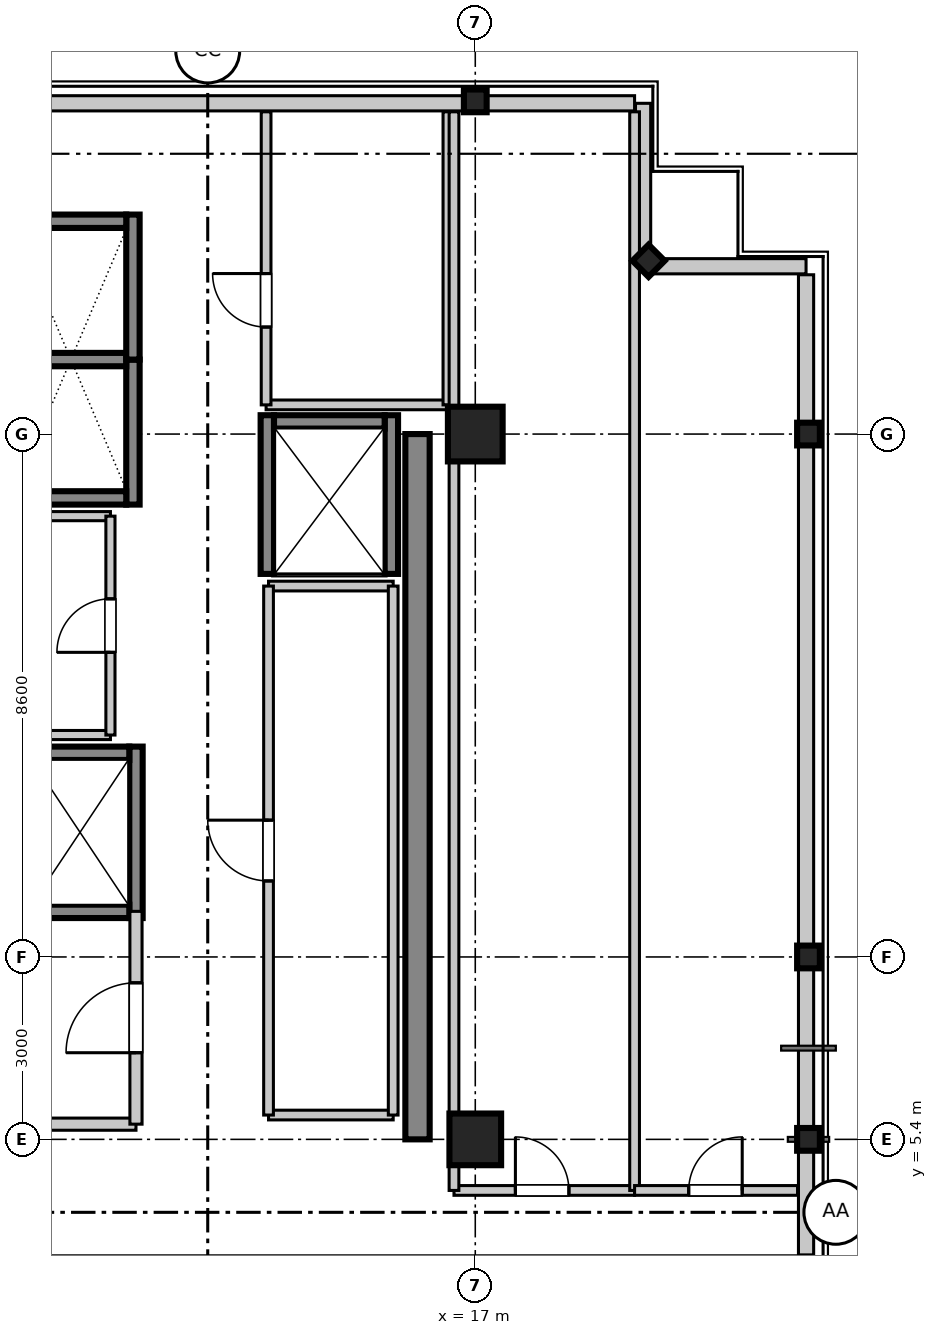
"""IFC4 building model, lengths in metres.
Left out: names, types, materials, properties, quantities, classifications, styles, units other than length and angle.
Written with IfcOpenShell. Run it as: python <this file> out.ifc"""

import sys

from ifc_helpers import new_model, si_unit, direction, frame, frame_2d, origin, origin_2d, place, context, subcontext, project, spatial, rectangle, i_section, extrude, source, transform, mapped, element, fill, save


model = new_model("IFC4")
c1 = context("Model", 3, precision=1e-05, world=origin(), true_north=direction((0.0, 1.0)))
c2 = subcontext(c1, "Body", "Model", "MODEL_VIEW")
j1 = project(units=[si_unit("LENGTHUNIT", "METRE"), si_unit("PLANEANGLEUNIT", "RADIAN")], contexts=[c1])
p1 = place(None, origin())
s1 = spatial("IfcSite", under=j1, at=p1, CompositionType="ELEMENT")
p2 = place(p1, origin())
s2 = spatial("IfcBuilding", under=s1, at=p2, CompositionType="ELEMENT")
p3 = place(p2, frame((0.0, 0.0, 296.5)))
s3 = spatial("IfcBuildingStorey", under=s2, at=p3, CompositionType="ELEMENT", Elevation=296.5)
m1 = source(origin(), c2, "Body", "SweptSolid", [
    extrude(rectangle(XDim=0.85, YDim=0.85, at=origin_2d()), origin(), (0.0, 0.0, 1.0), 3.805),
])
p4 = place(p3, frame((17.0, 5.4, 0.0), z_axis=(0.0, 0.0, 1.0), x_axis=(1.0, 0.0, 0.0)))
e1 = element("IfcColumn", 1, at=p4, inside=s3, PredefinedType="PILASTER", context=c2, shape_type="MappedRepresentation", body=[
    mapped(m1, transform((0.0, 0.0, 0.0), scale=1.0)),
])
m2 = source(origin(), c2, "Body", "SweptSolid", [
    extrude(rectangle(XDim=0.9, YDim=0.9, at=origin_2d()), origin(), (0.0, 0.0, 1.0), 3.805),
])
p5 = place(p3, frame((17.0, 17.0, 0.0), z_axis=(0.0, 0.0, 1.0), x_axis=(1.0, 0.0, 0.0)))
e2 = element("IfcColumn", 2, at=p5, inside=s3, PredefinedType="COLUMN", context=c2, shape_type="MappedRepresentation", body=[
    mapped(m2, transform((0.0, 0.0, 0.0), scale=1.0)),
])
m3 = source(origin(), c2, "Body", "SweptSolid", [
    extrude(i_section(OverallWidth=0.374, OverallDepth=0.374, WebThickness=0.014, FlangeThickness=0.023, at=origin_2d()), origin(), (0.0, 0.0, 1.0), 3.805),
])
for number, where, z_axis, x_axis in (
    (3, (22.48, 5.4, 0.0), (0.0, 0.0, 1.0), (1.0, 0.0, 0.0)),
    (4, (22.48, 8.4, 0.0), (0.0, 0.0, 1.0), (1.0, 0.0, 0.0)),
    (5, (22.48, 17.0, 0.0), (0.0, 0.0, 1.0), (1.0, 0.0, 0.0)),
    (6, (17.0, 22.48, 0.0), (0.0, 0.0, 1.0), (0.0, 1.0, 0.0)),
    (7, (19.85, 19.85, 0.0), (0.0, 0.0, 1.0), (0.707, 0.707, 0.0)),
):
    element("IfcColumn", number, at=place(p3, frame(where, z_axis=z_axis, x_axis=x_axis)), inside=s3, PredefinedType="COLUMN", context=c2, shape_type="MappedRepresentation", body=[
        mapped(m3, transform((0.0, 0.0, 0.0), scale=1.0)),
    ])
m4 = source(origin(), c2, "Body", "SweptSolid", [
    extrude(rectangle(XDim=11.6, YDim=0.4, at=frame_2d((5.8, 0.0))), origin(), (0.0, 0.0, 1.0), 3.55),
])
p6 = place(p3, frame((16.05, 5.4, 0.0), z_axis=(0.0, 0.0, 1.0), x_axis=(0.0, 1.0, 0.0)))
e8 = element("IfcWall", 8, at=p6, inside=s3, PredefinedType="SHEAR", context=c2, shape_type="MappedRepresentation", body=[
    mapped(m4, transform((0.0, 0.0, 0.0), scale=1.0)),
])
m5 = source(origin(), c2, "Body", "SweptSolid", [
    extrude(rectangle(XDim=2.385, YDim=0.22, at=frame_2d((1.192, 0.0))), origin(), (0.0, 0.0, 1.0), 3.55),
])
p7 = place(p3, frame((11.37, 15.84, 0.0), z_axis=(0.0, 0.0, 1.0), x_axis=(0.0, 1.0, 0.0)))
e9 = element("IfcWall", 9, at=p7, inside=s3, PredefinedType="SHEAR", context=c2, shape_type="MappedRepresentation", body=[
    mapped(m5, transform((0.0, 0.0, 0.0), scale=1.0)),
])
m6 = source(origin(), c2, "Body", "SweptSolid", [
    extrude(rectangle(XDim=1.82, YDim=0.22, at=frame_2d((0.91, 0.0))), origin(), (0.0, 0.0, 1.0), 3.55),
])
p8 = place(p3, frame((9.44, 15.95, 0.0), z_axis=(0.0, 0.0, 1.0), x_axis=(1.0, 0.0, 0.0)))
e10 = element("IfcWall", 10, at=p8, inside=s3, PredefinedType="SHEAR", context=c2, shape_type="MappedRepresentation", body=[
    mapped(m6, transform((0.0, 0.0, 0.0), scale=1.0)),
])
m7 = source(origin(), c2, "Body", "SweptSolid", [
    extrude(rectangle(XDim=1.82, YDim=0.22, at=frame_2d((0.91, 0.0))), origin(), (0.0, 0.0, 1.0), 3.85),
])
p9 = place(p3, frame((9.44, 18.225, 0.0), z_axis=(0.0, 0.0, 1.0), x_axis=(1.0, 0.0, 0.0)))
e11 = element("IfcWall", 11, at=p9, inside=s3, PredefinedType="SHEAR", context=c2, shape_type="MappedRepresentation", body=[
    mapped(m7, transform((0.0, 0.0, 0.0), scale=1.0)),
])
p10 = place(p3, frame((11.37, 18.225, 0.0), z_axis=(0.0, 0.0, 1.0), x_axis=(0.0, 1.0, 0.0)))
e12 = element("IfcWall", 12, at=p10, inside=s3, PredefinedType="SHEAR", context=c2, shape_type="MappedRepresentation", body=[
    mapped(m5, transform((0.0, 0.0, 0.0), scale=1.0)),
])
p11 = place(p3, frame((9.44, 20.5, 0.0), z_axis=(0.0, 0.0, 1.0), x_axis=(1.0, 0.0, 0.0)))
e13 = element("IfcWall", 13, at=p11, inside=s3, PredefinedType="SHEAR", context=c2, shape_type="MappedRepresentation", body=[
    mapped(m6, transform((0.0, 0.0, 0.0), scale=1.0)),
])
m8 = source(origin(), c2, "Body", "SweptSolid", [
    extrude(rectangle(XDim=2.82, YDim=0.22, at=frame_2d((1.41, 0.0))), origin(), (0.0, 0.0, 1.0), 3.55),
])
p12 = place(p3, frame((11.42, 9.04, 0.0), z_axis=(0.0, 0.0, 1.0), x_axis=(0.0, 1.0, 0.0)))
e14 = element("IfcWall", 14, at=p12, inside=s3, PredefinedType="SHEAR", context=c2, shape_type="MappedRepresentation", body=[
    mapped(m8, transform((0.0, 0.0, 0.0), scale=1.0)),
])
m9 = source(origin(), c2, "Body", "SweptSolid", [
    extrude(rectangle(XDim=1.62, YDim=0.22, at=frame_2d((0.81, 0.0))), origin(), (0.0, 0.0, 1.0), 3.55),
])
for number, where, z_axis, x_axis in (
    (15, (9.69, 9.15, 0.0), (0.0, 0.0, 1.0), (1.0, 0.0, 0.0)),
    (16, (9.69, 11.75, 0.0), (0.0, 0.0, 1.0), (1.0, 0.0, 0.0)),
):
    element("IfcWall", number, at=place(p3, frame(where, z_axis=z_axis, x_axis=x_axis)), inside=s3, PredefinedType="SHEAR", context=c2, shape_type="MappedRepresentation", body=[
        mapped(m9, transform((0.0, 0.0, 0.0), scale=1.0)),
    ])
m10 = source(origin(), c2, "Body", "SweptSolid", [
    extrude(rectangle(XDim=2.61, YDim=0.22, at=frame_2d((1.305, 0.0))), origin(), (0.0, 0.0, 1.0), 3.55),
])
for number, where, z_axis, x_axis in (
    (17, (13.58, 14.7, 0.0), (0.0, 0.0, 1.0), (0.0, 1.0, 0.0)),
    (18, (15.62, 14.7, 0.0), (0.0, 0.0, 1.0), (0.0, 1.0, 0.0)),
):
    element("IfcWall", number, at=place(p3, frame(where, z_axis=z_axis, x_axis=x_axis)), inside=s3, PredefinedType="SHEAR", context=c2, shape_type="MappedRepresentation", body=[
        mapped(m10, transform((0.0, 0.0, 0.0), scale=1.0)),
    ])
p13 = place(p3, frame((13.69, 17.2, 0.0), z_axis=(0.0, 0.0, 1.0), x_axis=(1.0, 0.0, 0.0)))
e19 = element("IfcWall", 19, at=p13, inside=s3, PredefinedType="SHEAR", context=c2, shape_type="MappedRepresentation", body=[
    mapped(m6, transform((0.0, 0.0, 0.0), scale=1.0)),
])
m11 = source(origin(), c2, "Body", "SweptSolid", [
    extrude(rectangle(XDim=3.82, YDim=0.2, at=frame_2d((1.91, 0.0))), origin(), (0.0, 0.0, 1.0), 2.89),
])
p14 = place(p3, frame((7.6, 5.65, 0.0), z_axis=(0.0, 0.0, 1.0), x_axis=(1.0, 0.0, 0.0)))
e20 = element("IfcWall", 20, at=p14, inside=s3, PredefinedType="PARTITIONING", context=c2, shape_type="MappedRepresentation", body=[
    mapped(m11, transform((0.0, 0.0, 0.0), scale=1.0)),
])
m12 = source(origin(), c2, "Body", "SweptSolid", [
    extrude(rectangle(XDim=3.5, YDim=0.2, at=frame_2d((1.75, 0.0))), origin(), (0.0, 0.0, 1.0), 2.89),
])
p15 = place(p3, frame((11.42, 5.65, 0.0), z_axis=(0.0, 0.0, 1.0), x_axis=(0.0, 1.0, 0.0)))
e21 = element("IfcWall", 21, at=p15, inside=s3, PredefinedType="PARTITIONING", context=c2, shape_type="MappedRepresentation", body=[
    mapped(m12, transform((0.0, 0.0, 0.0), scale=1.0)),
])
p16 = place(p15, frame((1.175, 0.0, 0.0)))
e22 = element("IfcOpeningElement", 22, at=p16, cuts=e21, PredefinedType="OPENING", context=c2, shape_type="SweptSolid", body=[
    extrude(rectangle(XDim=1.15, YDim=2.15, at=frame_2d((0.575, 1.075))), frame((0.0, 0.11, 0.0), z_axis=(0.0, -1.0, 0.0), x_axis=(1.0, 0.0, 0.0)), (0.0, 0.0, 1.0), 0.22),
])
m13 = source(origin(), c2, "Body", "SweptSolid", [
    extrude(rectangle(XDim=1.75, YDim=0.15, at=frame_2d((0.875, 0.0))), origin(), (0.0, 0.0, 1.0), 2.89),
])
for number, where, z_axis, x_axis in (
    (23, (9.25, 12.05, 0.0), (0.0, 0.0, 1.0), (1.0, 0.0, 0.0)),
    (24, (9.25, 15.65, 0.0), (0.0, 0.0, 1.0), (1.0, 0.0, 0.0)),
):
    element("IfcWall", number, at=place(p3, frame(where, z_axis=z_axis, x_axis=x_axis)), inside=s3, PredefinedType="PARTITIONING", context=c2, shape_type="MappedRepresentation", body=[
        mapped(m13, transform((0.0, 0.0, 0.0), scale=1.0)),
    ])
m14 = source(origin(), c2, "Body", "SweptSolid", [
    extrude(rectangle(XDim=3.6, YDim=0.15, at=frame_2d((1.8, 0.0))), origin(), (0.0, 0.0, 1.0), 2.89),
])
p17 = place(p3, frame((11.0, 12.05, 0.0), z_axis=(0.0, 0.0, 1.0), x_axis=(0.0, 1.0, 0.0)))
e25 = element("IfcWall", 25, at=p17, inside=s3, PredefinedType="PARTITIONING", context=c2, shape_type="MappedRepresentation", body=[
    mapped(m14, transform((0.0, 0.0, 0.0), scale=1.0)),
])
p18 = place(p17, frame((1.36, 0.0, 0.0)))
e26 = element("IfcOpeningElement", 26, at=p18, cuts=e25, PredefinedType="OPENING", context=c2, shape_type="SweptSolid", body=[
    extrude(rectangle(XDim=0.88, YDim=2.1, at=frame_2d((0.44, 1.05))), frame((0.0, 0.085, 0.0), z_axis=(0.0, -1.0, 0.0), x_axis=(1.0, 0.0, 0.0)), (0.0, 0.0, 1.0), 0.17),
])
m15 = source(origin(), c2, "Body", "SweptSolid", [
    extrude(rectangle(XDim=16.0, YDim=0.25, at=frame_2d((8.0, 0.0))), origin(), (0.0, 0.0, 1.0), 2.89),
])
p19 = place(p3, frame((3.62, 22.44, 0.0), z_axis=(0.0, 0.0, 1.0), x_axis=(1.0, 0.0, 0.0)))
e27 = element("IfcWall", 27, at=p19, inside=s3, PredefinedType="STANDARD", context=c2, shape_type="MappedRepresentation", body=[
    mapped(m15, transform((0.0, 0.0, 0.0), scale=1.0)),
])
m16 = source(origin(), c2, "Body", "SweptSolid", [
    extrude(rectangle(XDim=2.54, YDim=0.25, at=frame_2d((1.27, 0.0))), origin(), (0.0, 0.0, 1.0), 2.89),
])
for number, where, z_axis, x_axis in (
    (28, (19.76, 19.9, 0.0), (0.0, 0.0, 1.0), (0.0, 1.0, 0.0)),
    (29, (19.9, 19.76, 0.0), (0.0, 0.0, 1.0), (1.0, 0.0, 0.0)),
):
    element("IfcWall", number, at=place(p3, frame(where, z_axis=z_axis, x_axis=x_axis)), inside=s3, PredefinedType="STANDARD", context=c2, shape_type="MappedRepresentation", body=[
        mapped(m16, transform((0.0, 0.0, 0.0), scale=1.0)),
    ])
m17 = source(origin(), c2, "Body", "SweptSolid", [
    extrude(rectangle(XDim=16.12, YDim=0.25, at=frame_2d((8.06, 0.0))), origin(), (0.0, 0.0, 1.0), 2.89),
])
p20 = place(p3, frame((22.44, 3.5, 0.0), z_axis=(0.0, 0.0, 1.0), x_axis=(0.0, 1.0, 0.0)))
e30 = element("IfcWall", 30, at=p20, inside=s3, PredefinedType="STANDARD", context=c2, shape_type="MappedRepresentation", body=[
    mapped(m17, transform((0.0, 0.0, 0.0), scale=1.0)),
])
m18 = source(origin(), c2, "Body", "SweptSolid", [
    extrude(rectangle(XDim=2.05, YDim=0.16, at=frame_2d((1.025, 0.0))), origin(), (0.0, 0.0, 1.0), 2.89),
])
for number, where, z_axis, x_axis in (
    (31, (13.6, 5.8, 0.0), (0.0, 0.0, 1.0), (1.0, 0.0, 0.0)),
    (32, (13.6, 14.5, 0.0), (0.0, 0.0, 1.0), (1.0, 0.0, 0.0)),
):
    element("IfcWall", number, at=place(p3, frame(where, z_axis=z_axis, x_axis=x_axis)), inside=s3, PredefinedType="PARTITIONING", context=c2, shape_type="MappedRepresentation", body=[
        mapped(m18, transform((0.0, 0.0, 0.0), scale=1.0)),
    ])
m19 = source(origin(), c2, "Body", "SweptSolid", [
    extrude(rectangle(XDim=8.7, YDim=0.16, at=frame_2d((4.35, 0.0))), origin(), (0.0, 0.0, 1.0), 2.89),
])
p21 = place(p3, frame((13.6, 5.8, 0.0), z_axis=(0.0, 0.0, 1.0), x_axis=(0.0, 1.0, 0.0)))
e33 = element("IfcWall", 33, at=p21, inside=s3, PredefinedType="PARTITIONING", context=c2, shape_type="MappedRepresentation", body=[
    mapped(m19, transform((0.0, 0.0, 0.0), scale=1.0)),
])
p22 = place(p21, frame((3.85, 0.0, 0.0)))
e34 = element("IfcOpeningElement", 34, at=p22, cuts=e33, PredefinedType="OPENING", context=c2, shape_type="SweptSolid", body=[
    extrude(rectangle(XDim=1.0, YDim=2.1, at=frame_2d((0.5, 1.05))), frame((0.0, 0.09, 0.0), z_axis=(0.0, -1.0, 0.0), x_axis=(1.0, 0.0, 0.0)), (0.0, 0.0, 1.0), 0.18),
])
p23 = place(p3, frame((15.65, 5.8, 0.0), z_axis=(0.0, 0.0, 1.0), x_axis=(0.0, 1.0, 0.0)))
e35 = element("IfcWall", 35, at=p23, inside=s3, PredefinedType="PARTITIONING", context=c2, shape_type="MappedRepresentation", body=[
    mapped(m19, transform((0.0, 0.0, 0.0), scale=1.0)),
])
m20 = source(origin(), c2, "Body", "SweptSolid", [
    extrude(rectangle(XDim=2.99, YDim=0.16, at=frame_2d((1.495, 0.0))), origin(), (0.0, 0.0, 1.0), 2.89),
])
p24 = place(p3, frame((13.56, 17.48, 0.0), z_axis=(0.0, 0.0, 1.0), x_axis=(1.0, 0.0, 0.0)))
e36 = element("IfcWall", 36, at=p24, inside=s3, PredefinedType="PARTITIONING", context=c2, shape_type="MappedRepresentation", body=[
    mapped(m20, transform((0.0, 0.0, 0.0), scale=1.0)),
])
m21 = source(origin(), c2, "Body", "SweptSolid", [
    extrude(rectangle(XDim=4.82, YDim=0.16, at=frame_2d((2.41, 0.0))), origin(), (0.0, 0.0, 1.0), 2.89),
])
p25 = place(p3, frame((13.56, 17.48, 0.0), z_axis=(0.0, 0.0, 1.0), x_axis=(0.0, 1.0, 0.0)))
e37 = element("IfcWall", 37, at=p25, inside=s3, PredefinedType="PARTITIONING", context=c2, shape_type="MappedRepresentation", body=[
    mapped(m21, transform((0.0, 0.0, 0.0), scale=1.0)),
])
p26 = place(p25, frame((1.28, 0.0, 0.0)))
e38 = element("IfcOpeningElement", 38, at=p26, cuts=e37, PredefinedType="OPENING", context=c2, shape_type="SweptSolid", body=[
    extrude(rectangle(XDim=0.88, YDim=2.1, at=frame_2d((0.44, 1.05))), frame((0.0, 0.09, 0.0), z_axis=(0.0, -1.0, 0.0), x_axis=(1.0, 0.0, 0.0)), (0.0, 0.0, 1.0), 0.18),
])
p27 = place(p3, frame((16.55, 17.48, 0.0), z_axis=(0.0, 0.0, 1.0), x_axis=(0.0, 1.0, 0.0)))
e39 = element("IfcWall", 39, at=p27, inside=s3, PredefinedType="PARTITIONING", context=c2, shape_type="MappedRepresentation", body=[
    mapped(m21, transform((0.0, 0.0, 0.0), scale=1.0)),
])
m22 = source(origin(), c2, "Body", "SweptSolid", [
    extrude(rectangle(XDim=2.97, YDim=0.16, at=frame_2d((1.485, 0.0))), origin(), (0.0, 0.0, 1.0), 2.89),
])
p28 = place(p3, frame((16.65, 4.56, 0.0), z_axis=(0.0, 0.0, 1.0), x_axis=(1.0, 0.0, 0.0)))
e40 = element("IfcWall", 40, at=p28, inside=s3, PredefinedType="PARTITIONING", context=c2, shape_type="MappedRepresentation", body=[
    mapped(m22, transform((0.0, 0.0, 0.0), scale=1.0)),
])
p29 = place(p28, frame((1.01, 0.0, 0.0)))
e41 = element("IfcOpeningElement", 41, at=p29, cuts=e40, PredefinedType="OPENING", context=c2, shape_type="SweptSolid", body=[
    extrude(rectangle(XDim=0.88, YDim=2.1, at=frame_2d((0.44, 1.05))), frame((0.0, 0.09, 0.0), z_axis=(0.0, -1.0, 0.0), x_axis=(1.0, 0.0, 0.0)), (0.0, 0.0, 1.0), 0.18),
])
m23 = source(origin(), c2, "Body", "SweptSolid", [
    extrude(rectangle(XDim=17.74, YDim=0.16, at=frame_2d((8.87, 0.0))), origin(), (0.0, 0.0, 1.0), 2.89),
])
for number, where, z_axis, x_axis in (
    (42, (16.65, 4.56, 0.0), (0.0, 0.0, 1.0), (0.0, 1.0, 0.0)),
    (43, (19.62, 4.56, 0.0), (0.0, 0.0, 1.0), (0.0, 1.0, 0.0)),
):
    element("IfcWall", number, at=place(p3, frame(where, z_axis=z_axis, x_axis=x_axis)), inside=s3, PredefinedType="PARTITIONING", context=c2, shape_type="MappedRepresentation", body=[
        mapped(m23, transform((0.0, 0.0, 0.0), scale=1.0)),
    ])
m24 = source(origin(), c2, "Body", "SweptSolid", [
    extrude(rectangle(XDim=2.68, YDim=0.16, at=frame_2d((1.34, 0.0))), origin(), (0.0, 0.0, 1.0), 2.89),
])
p30 = place(p3, frame((19.62, 4.56, 0.0), z_axis=(0.0, 0.0, 1.0), x_axis=(1.0, 0.0, 0.0)))
e44 = element("IfcWall", 44, at=p30, inside=s3, PredefinedType="PARTITIONING", context=c2, shape_type="MappedRepresentation", body=[
    mapped(m24, transform((0.0, 0.0, 0.0), scale=1.0)),
])
p31 = place(p30, frame((0.89, 0.0, 0.0)))
e45 = element("IfcOpeningElement", 45, at=p31, cuts=e44, PredefinedType="OPENING", context=c2, shape_type="SweptSolid", body=[
    extrude(rectangle(XDim=0.88, YDim=2.1, at=frame_2d((0.44, 1.05))), frame((0.0, 0.09, 0.0), z_axis=(0.0, -1.0, 0.0), x_axis=(1.0, 0.0, 0.0)), (0.0, 0.0, 1.0), 0.18),
])
m25 = source(origin(), c2, "Body", "SweptSolid", [
    extrude(rectangle(XDim=1.15, YDim=2.15, at=frame_2d((0.575, 1.075))), frame((0.0, 0.025, 0.0), z_axis=(0.0, -1.0, 0.0), x_axis=(1.0, 0.0, 0.0)), (0.0, 0.0, 1.0), 0.05),
])
p32 = place(p16, frame((1.15, 0.0, 0.0), z_axis=(0.0, 0.0, 1.0), x_axis=(-1.0, 0.0, 0.0)))
e46 = element("IfcDoor", 46, at=p32, inside=s3, OperationType="SINGLE_SWING_LEFT", PredefinedType="DOOR", context=c2, shape_type="MappedRepresentation", body=[
    mapped(m25, transform((0.0, 0.0, 0.0), scale=1.0)),
])
fill(e22, e46)
m26 = source(origin(), c2, "Body", "SweptSolid", [
    extrude(rectangle(XDim=0.88, YDim=2.1, at=frame_2d((0.44, 1.05))), frame((0.0, 0.025, 0.0), z_axis=(0.0, -1.0, 0.0), x_axis=(1.0, 0.0, 0.0)), (0.0, 0.0, 1.0), 0.05),
])
p33 = place(p18, origin())
e47 = element("IfcDoor", 47, at=p33, inside=s3, OperationType="SINGLE_SWING_LEFT", PredefinedType="DOOR", context=c2, shape_type="MappedRepresentation", body=[
    mapped(m26, transform((0.0, 0.0, 0.0), scale=1.0)),
])
fill(e26, e47)
m27 = source(origin(), c2, "Body", "SweptSolid", [
    extrude(rectangle(XDim=1.0, YDim=2.1, at=frame_2d((0.5, 1.05))), frame((0.0, 0.025, 0.0), z_axis=(0.0, -1.0, 0.0), x_axis=(1.0, 0.0, 0.0)), (0.0, 0.0, 1.0), 0.05),
])
p34 = place(p22, frame((1.0, 0.0, 0.0), z_axis=(0.0, 0.0, 1.0), x_axis=(-1.0, 0.0, 0.0)))
e48 = element("IfcDoor", 48, at=p34, inside=s3, OperationType="SINGLE_SWING_RIGHT", PredefinedType="DOOR", context=c2, shape_type="MappedRepresentation", body=[
    mapped(m27, transform((0.0, 0.0, 0.0), scale=1.0)),
])
fill(e34, e48)
p35 = place(p26, frame((0.88, 0.0, 0.0), z_axis=(0.0, 0.0, 1.0), x_axis=(-1.0, 0.0, 0.0)))
e49 = element("IfcDoor", 49, at=p35, inside=s3, OperationType="SINGLE_SWING_RIGHT", PredefinedType="DOOR", context=c2, shape_type="MappedRepresentation", body=[
    mapped(m26, transform((0.0, 0.0, 0.0), scale=1.0)),
])
fill(e38, e49)
p36 = place(p29, origin())
e50 = element("IfcDoor", 50, at=p36, inside=s3, OperationType="SINGLE_SWING_LEFT", PredefinedType="DOOR", context=c2, shape_type="MappedRepresentation", body=[
    mapped(m26, transform((0.0, 0.0, 0.0), scale=1.0)),
])
fill(e41, e50)
p37 = place(p31, origin())
e51 = element("IfcDoor", 51, at=p37, inside=s3, OperationType="SINGLE_SWING_RIGHT", PredefinedType="DOOR", context=c2, shape_type="MappedRepresentation", body=[
    mapped(m26, transform((0.0, 0.0, 0.0), scale=1.0)),
])
fill(e45, e51)
save(model, sys.argv[1])
